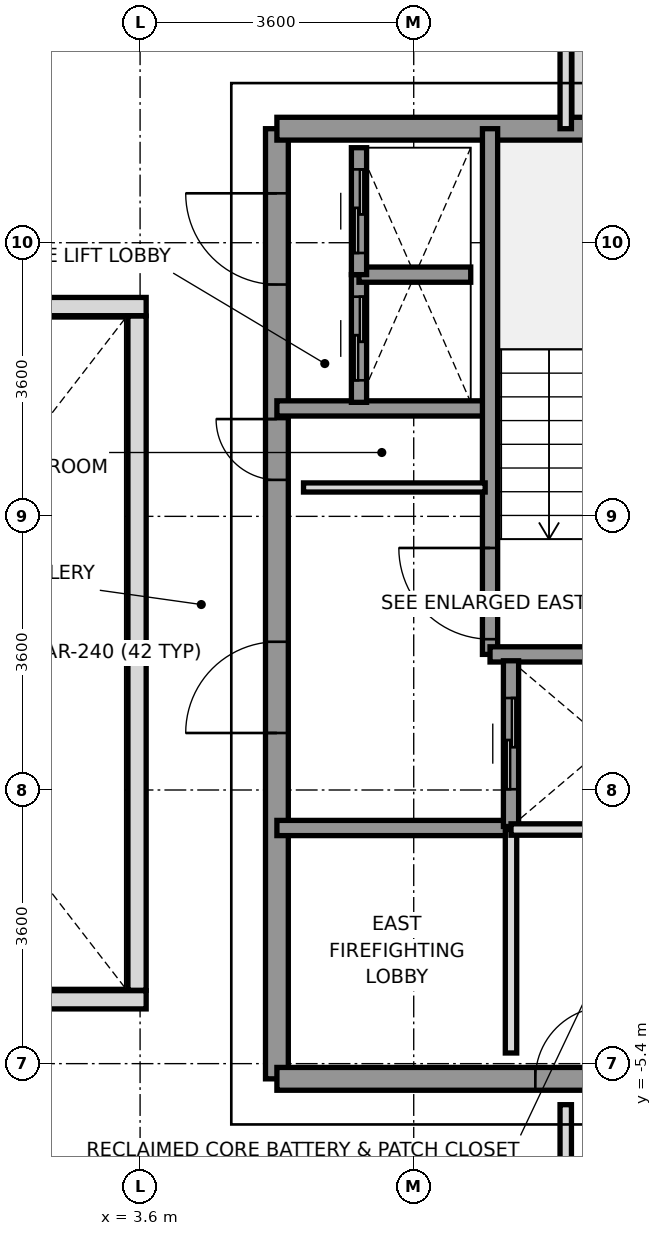
"""IFC4 building model, lengths in metres.
Left out: names, types, materials, properties, quantities, classifications, styles, units other than length and angle.
Written with IfcOpenShell. Run it as: python <this file> out.ifc"""

import sys

from ifc_helpers import new_model, si_unit, direction, frame, frame_2d, origin, place, context, subcontext, project, spatial, rectangle, extrude, source, transform, mapped, element, fill, save


model = new_model("IFC4")
c1 = context("Model", 3, precision=1e-05, world=origin(), true_north=direction((0.0, 1.0)))
c2 = subcontext(c1, "Body", "Model", "MODEL_VIEW")
j1 = project(units=[si_unit("LENGTHUNIT", "METRE"), si_unit("PLANEANGLEUNIT", "RADIAN")], contexts=[c1])
p1 = place(None, origin())
s1 = spatial("IfcSite", under=j1, at=p1, CompositionType="ELEMENT")
p2 = place(p1, origin())
s2 = spatial("IfcBuilding", under=s1, at=p2, CompositionType="ELEMENT")
p3 = place(p2, frame((0.0, 0.0, 236.4)))
s3 = spatial("IfcBuildingStorey", under=s2, at=p3, CompositionType="ELEMENT", Elevation=236.4)
p4 = place(p3, frame((9.4, 8.622, 0.0), z_axis=(0.0, 0.0, 1.0), x_axis=(0.0, -1.0, 0.0)))
e1 = element("IfcWall", 1, at=p4, inside=s3, PredefinedType="PARAPET", context=c2, shape_type="SweptSolid", body=[
    extrude(rectangle(XDim=1.669, YDim=0.24, at=frame_2d((0.834, 0.0))), origin(), (0.0, 0.0, 1.0), 1.15),
])
p5 = place(p3, frame((5.4, -5.6, 0.0), z_axis=(0.0, 0.0, 1.0), x_axis=(0.0, 1.0, 0.0)))
e2 = element("IfcWall", 2, at=p5, inside=s3, PredefinedType="SHEAR", context=c2, shape_type="SweptSolid", body=[
    extrude(rectangle(XDim=12.5, YDim=0.3, at=frame_2d((6.25, 0.0))), origin(), (0.0, 0.0, 1.0), 3.01),
])
p6 = place(p5, frame((4.55, 0.0, 0.0)))
e3 = element("IfcOpeningElement", 3, at=p6, cuts=e2, PredefinedType="OPENING", context=c2, shape_type="SweptSolid", body=[
    extrude(rectangle(XDim=1.2, YDim=2.2, at=frame_2d((0.6, 1.1))), frame((0.0, 0.16, 0.0), z_axis=(0.0, -1.0, 0.0), x_axis=(1.0, 0.0, 0.0)), (0.0, 0.0, 1.0), 0.32),
])
p7 = place(p5, frame((10.45, 0.0, 0.0)))
e4 = element("IfcOpeningElement", 4, at=p7, cuts=e2, PredefinedType="OPENING", context=c2, shape_type="SweptSolid", body=[
    extrude(rectangle(XDim=1.2, YDim=2.2, at=frame_2d((0.6, 1.1))), frame((0.0, 0.16, 0.0), z_axis=(0.0, -1.0, 0.0), x_axis=(1.0, 0.0, 0.0)), (0.0, 0.0, 1.0), 0.32),
])
p8 = place(p5, frame((7.88, 0.0, 0.0)))
e5 = element("IfcOpeningElement", 5, at=p8, cuts=e2, PredefinedType="OPENING", context=c2, shape_type="SweptSolid", body=[
    extrude(rectangle(XDim=0.8, YDim=2.1, at=frame_2d((0.4, 1.05))), frame((0.0, 0.16, 0.0), z_axis=(0.0, -1.0, 0.0), x_axis=(1.0, 0.0, 0.0)), (0.0, 0.0, 1.0), 0.32),
])
p9 = place(p3, frame((5.4, 6.9, 0.0), z_axis=(0.0, 0.0, 1.0), x_axis=(1.0, 0.0, 0.0)))
e6 = element("IfcWall", 6, at=p9, inside=s3, PredefinedType="SHEAR", context=c2, shape_type="SweptSolid", body=[
    extrude(rectangle(XDim=5.956, YDim=0.3, at=frame_2d((2.978, 0.0))), origin(), (0.0, 0.0, 1.0), 3.01),
])
p10 = place(p3, frame((5.4, -5.6, 0.0), z_axis=(0.0, 0.0, 1.0), x_axis=(1.0, 0.0, 0.0)))
e7 = element("IfcWall", 7, at=p10, inside=s3, PredefinedType="SHEAR", context=c2, shape_type="SweptSolid", body=[
    extrude(rectangle(XDim=7.8, YDim=0.3, at=frame_2d((3.9, 0.0))), origin(), (0.0, 0.0, 1.0), 3.01),
])
p11 = place(p10, frame((5.85, 0.0, 0.0)))
e8 = element("IfcOpeningElement", 8, at=p11, cuts=e7, PredefinedType="OPENING", context=c2, shape_type="SweptSolid", body=[
    extrude(rectangle(XDim=0.8, YDim=2.1, at=frame_2d((0.4, 1.05))), frame((0.0, 0.16, 0.0), z_axis=(0.0, -1.0, 0.0), x_axis=(1.0, 0.0, 0.0)), (0.0, 0.0, 1.0), 0.32),
])
p12 = place(p10, frame((3.4, 0.0, 0.0)))
e9 = element("IfcOpeningElement", 9, at=p12, cuts=e7, PredefinedType="OPENING", context=c2, shape_type="SweptSolid", body=[
    extrude(rectangle(XDim=0.95, YDim=2.15, at=frame_2d((0.475, 1.075))), frame((0.0, 0.16, 0.0), z_axis=(0.0, -1.0, 0.0), x_axis=(1.0, 0.0, 0.0)), (0.0, 0.0, 1.0), 0.32),
])
p13 = place(p3, frame((5.4, 3.22, 0.0), z_axis=(0.0, 0.0, 1.0), x_axis=(1.0, 0.0, 0.0)))
e10 = element("IfcWall", 10, at=p13, inside=s3, PredefinedType="SOLIDWALL", context=c2, shape_type="SweptSolid", body=[
    extrude(rectangle(XDim=2.78, YDim=0.2, at=frame_2d((1.39, 0.0))), origin(), (0.0, 0.0, 1.0), 3.01),
])
p14 = place(p3, frame((5.4, -2.3, 0.0), z_axis=(0.0, 0.0, 1.0), x_axis=(1.0, 0.0, 0.0)))
e11 = element("IfcWall", 11, at=p14, inside=s3, PredefinedType="SOLIDWALL", context=c2, shape_type="SweptSolid", body=[
    extrude(rectangle(XDim=3.08, YDim=0.2, at=frame_2d((1.54, 0.0))), origin(), (0.0, 0.0, 1.0), 3.01),
])
p15 = place(p3, frame((8.204, -0.016, 0.0), z_axis=(0.0, 0.0, 1.0), x_axis=(0.0, 1.0, 0.0)))
e12 = element("IfcWall", 12, at=p15, inside=s3, PredefinedType="SOLIDWALL", context=c2, shape_type="SweptSolid", body=[
    extrude(rectangle(XDim=6.916, YDim=0.2, at=frame_2d((3.458, 0.0))), origin(), (0.0, 0.0, 1.0), 3.01),
])
p16 = place(p15, frame((0.2, 0.0, 0.0)))
e13 = element("IfcOpeningElement", 13, at=p16, cuts=e12, PredefinedType="OPENING", context=c2, shape_type="SweptSolid", body=[
    extrude(rectangle(XDim=1.2, YDim=2.2, at=frame_2d((0.6, 1.1))), frame((0.0, 0.11, 0.0), z_axis=(0.0, -1.0, 0.0), x_axis=(1.0, 0.0, 0.0)), (0.0, 0.0, 1.0), 0.22),
])
p17 = place(p3, frame((8.204, -0.016, 0.0), z_axis=(0.0, 0.0, 1.0), x_axis=(1.0, 0.0, 0.0)))
e14 = element("IfcWall", 14, at=p17, inside=s3, PredefinedType="SOLIDWALL", context=c2, shape_type="SweptSolid", body=[
    extrude(rectangle(XDim=3.152, YDim=0.2, at=frame_2d((1.576, 0.0))), origin(), (0.0, 0.0, 1.0), 3.01),
])
p18 = place(p3, frame((8.48, -2.28, 0.0), z_axis=(0.0, 0.0, 1.0), x_axis=(0.0, 1.0, 0.0)))
e15 = element("IfcWall", 15, at=p18, inside=s3, PredefinedType="SOLIDWALL", context=c2, shape_type="SweptSolid", body=[
    extrude(rectangle(XDim=2.18, YDim=0.2, at=frame_2d((1.09, 0.0))), origin(), (0.0, 0.0, 1.0), 3.01),
])
p19 = place(p18, frame((0.49, 0.0, 0.0)))
e16 = element("IfcOpeningElement", 16, at=p19, cuts=e15, PredefinedType="OPENING", context=c2, shape_type="SweptSolid", body=[
    extrude(rectangle(XDim=1.2, YDim=2.2, at=frame_2d((0.6, 1.1))), frame((0.0, 0.11, 0.0), z_axis=(0.0, -1.0, 0.0), x_axis=(1.0, 0.0, 0.0)), (0.0, 0.0, 1.0), 0.22),
])
p20 = place(p3, frame((6.48, 3.3, 0.0), z_axis=(0.0, 0.0, 1.0), x_axis=(0.0, 1.0, 0.0)))
e17 = element("IfcWall", 17, at=p20, inside=s3, PredefinedType="SOLIDWALL", context=c2, shape_type="SweptSolid", body=[
    extrude(rectangle(XDim=1.68, YDim=0.2, at=frame_2d((0.84, 0.0))), origin(), (0.0, 0.0, 1.0), 3.01),
])
p21 = place(p20, frame((0.29, 0.0, 0.0)))
e18 = element("IfcOpeningElement", 18, at=p21, cuts=e17, PredefinedType="OPENING", context=c2, shape_type="SweptSolid", body=[
    extrude(rectangle(XDim=1.1, YDim=2.2, at=frame_2d((0.55, 1.1))), frame((0.0, 0.11, 0.0), z_axis=(0.0, -1.0, 0.0), x_axis=(1.0, 0.0, 0.0)), (0.0, 0.0, 1.0), 0.22),
])
p22 = place(p3, frame((6.48, 4.98, 0.0), z_axis=(0.0, 0.0, 1.0), x_axis=(1.0, 0.0, 0.0)))
e19 = element("IfcWall", 19, at=p22, inside=s3, PredefinedType="SOLIDWALL", context=c2, shape_type="SweptSolid", body=[
    extrude(rectangle(XDim=1.47, YDim=0.2, at=frame_2d((0.735, 0.0))), origin(), (0.0, 0.0, 1.0), 3.01),
])
p23 = place(p3, frame((6.48, 4.98, 0.0), z_axis=(0.0, 0.0, 1.0), x_axis=(0.0, 1.0, 0.0)))
e20 = element("IfcWall", 20, at=p23, inside=s3, PredefinedType="SOLIDWALL", context=c2, shape_type="SweptSolid", body=[
    extrude(rectangle(XDim=1.67, YDim=0.2, at=frame_2d((0.835, 0.0))), origin(), (0.0, 0.0, 1.0), 3.01),
])
p24 = place(p23, frame((0.285, 0.0, 0.0)))
e21 = element("IfcOpeningElement", 21, at=p24, cuts=e20, PredefinedType="OPENING", context=c2, shape_type="SweptSolid", body=[
    extrude(rectangle(XDim=1.1, YDim=2.2, at=frame_2d((0.55, 1.1))), frame((0.0, 0.11, 0.0), z_axis=(0.0, -1.0, 0.0), x_axis=(1.0, 0.0, 0.0)), (0.0, 0.0, 1.0), 0.22),
])
p25 = place(p3, frame((5.75, 2.18, 0.0), z_axis=(0.0, 0.0, 1.0), x_axis=(1.0, 0.0, 0.0)))
e22 = element("IfcWall", 22, at=p25, inside=s3, PredefinedType="PARTITIONING", context=c2, shape_type="SweptSolid", body=[
    extrude(rectangle(XDim=2.39, YDim=0.12, at=frame_2d((1.195, 0.0))), origin(), (0.0, 0.0, 1.0), 3.01),
])
p26 = place(p3, frame((8.48, -5.26, 0.0), z_axis=(0.0, 0.0, 1.0), x_axis=(0.0, 1.0, 0.0)))
e23 = element("IfcWall", 23, at=p26, inside=s3, PredefinedType="PARTITIONING", context=c2, shape_type="SweptSolid", body=[
    extrude(rectangle(XDim=2.94, YDim=0.15, at=frame_2d((1.47, 0.0))), origin(), (0.0, 0.0, 1.0), 3.01),
])
p27 = place(p3, frame((8.48, -2.32, 0.0), z_axis=(0.0, 0.0, 1.0), x_axis=(1.0, 0.0, 0.0)))
e24 = element("IfcWall", 24, at=p27, inside=s3, PredefinedType="PARTITIONING", context=c2, shape_type="SweptSolid", body=[
    extrude(rectangle(XDim=2.56, YDim=0.15, at=frame_2d((1.28, 0.0))), origin(), (0.0, 0.0, 1.0), 3.01),
])
p28 = place(p3, frame((9.2, 6.9, 0.0), z_axis=(0.0, 0.0, 1.0), x_axis=(0.0, 1.0, 0.0)))
e25 = element("IfcWall", 25, at=p28, inside=s3, PredefinedType="PARTITIONING", context=c2, shape_type="SweptSolid", body=[
    extrude(rectangle(XDim=3.38, YDim=0.15, at=frame_2d((1.69, 0.0))), origin(), (0.0, 0.0, 1.0), 2.61),
])
p29 = place(p3, frame((9.2, -10.28, 0.0), z_axis=(0.0, 0.0, 1.0), x_axis=(0.0, 1.0, 0.0)))
e26 = element("IfcWall", 26, at=p29, inside=s3, PredefinedType="PARTITIONING", context=c2, shape_type="SweptSolid", body=[
    extrude(rectangle(XDim=4.34, YDim=0.15, at=frame_2d((2.17, 0.0))), origin(), (0.0, 0.0, 1.0), 2.61),
])
for number, where, z_axis, x_axis in (
    (27, (-3.68, -4.56, 0.0), (0.0, 0.0, 1.0), (1.0, 0.0, 0.0)),
    (28, (-3.68, 4.56, 0.0), (0.0, 0.0, 1.0), (1.0, 0.0, 0.0)),
):
    element("IfcWall", number, at=place(p3, frame(where, z_axis=z_axis, x_axis=x_axis)), inside=s3, PredefinedType="PARAPET", context=c2, shape_type="SweptSolid", body=[
        extrude(rectangle(XDim=7.36, YDim=0.24, at=frame_2d((3.68, 0.0))), origin(), (0.0, 0.0, 1.0), 1.15),
    ])
p30 = place(p3, frame((3.56, -4.435, 0.0), z_axis=(0.0, 0.0, 1.0), x_axis=(0.0, 1.0, 0.0)))
e29 = element("IfcWall", 29, at=p30, inside=s3, PredefinedType="PARAPET", context=c2, shape_type="SweptSolid", body=[
    extrude(rectangle(XDim=8.87, YDim=0.24, at=frame_2d((4.435, 0.0))), origin(), (0.0, 0.0, 1.0), 1.15),
])
m1 = source(origin(), c2, "Body", "SweptSolid", [
    extrude(rectangle(XDim=1.2, YDim=2.2, at=frame_2d((0.6, 1.1))), frame((0.0, 0.025, 0.0), z_axis=(0.0, -1.0, 0.0), x_axis=(1.0, 0.0, 0.0)), (0.0, 0.0, 1.0), 0.05),
])
p31 = place(p16, origin())
e30 = element("IfcDoor", 30, at=p31, inside=s3, OperationType="SINGLE_SWING_RIGHT", PredefinedType="DOOR", context=c2, shape_type="MappedRepresentation", body=[
    mapped(m1, transform((0.0, 0.0, 0.0), x_axis=(1.0, 0.0, 0.0), y_axis=(0.0, 1.0, 0.0), z_axis=(0.0, 0.0, 1.0), scale=1.0)),
])
fill(e13, e30)
p32 = place(p6, origin())
e31 = element("IfcDoor", 31, at=p32, inside=s3, OperationType="SINGLE_SWING_LEFT", PredefinedType="DOOR", context=c2, shape_type="MappedRepresentation", body=[
    mapped(m1, transform((0.0, 0.0, 0.0), x_axis=(1.0, 0.0, 0.0), y_axis=(0.0, 1.0, 0.0), z_axis=(0.0, 0.0, 1.0), scale=1.0)),
])
fill(e3, e31)
p33 = place(p7, origin())
e32 = element("IfcDoor", 32, at=p33, inside=s3, OperationType="SINGLE_SWING_RIGHT", PredefinedType="DOOR", context=c2, shape_type="MappedRepresentation", body=[
    mapped(m1, transform((0.0, 0.0, 0.0), x_axis=(1.0, 0.0, 0.0), y_axis=(0.0, 1.0, 0.0), z_axis=(0.0, 0.0, 1.0), scale=1.0)),
])
fill(e4, e32)
m2 = source(origin(), c2, "Body", "SweptSolid", [
    extrude(rectangle(XDim=0.8, YDim=2.1, at=frame_2d((0.4, 1.05))), frame((0.0, 0.025, 0.0), z_axis=(0.0, -1.0, 0.0), x_axis=(1.0, 0.0, 0.0)), (0.0, 0.0, 1.0), 0.05),
])
p34 = place(p8, origin())
e33 = element("IfcDoor", 33, at=p34, inside=s3, OperationType="SINGLE_SWING_RIGHT", PredefinedType="DOOR", context=c2, shape_type="MappedRepresentation", body=[
    mapped(m2, transform((0.0, 0.0, 0.0), x_axis=(1.0, 0.0, 0.0), y_axis=(0.0, 1.0, 0.0), z_axis=(0.0, 0.0, 1.0), scale=1.0)),
])
fill(e5, e33)
m3 = source(origin(), c2, "Body", "SweptSolid", [
    extrude(rectangle(XDim=0.95, YDim=2.15, at=frame_2d((0.475, 1.075))), frame((0.0, 0.025, 0.0), z_axis=(0.0, -1.0, 0.0), x_axis=(1.0, 0.0, 0.0)), (0.0, 0.0, 1.0), 0.05),
])
p35 = place(p12, origin())
e34 = element("IfcDoor", 34, at=p35, inside=s3, OperationType="SINGLE_SWING_RIGHT", PredefinedType="DOOR", context=c2, shape_type="MappedRepresentation", body=[
    mapped(m3, transform((0.0, 0.0, 0.0), x_axis=(1.0, 0.0, 0.0), y_axis=(0.0, 1.0, 0.0), z_axis=(0.0, 0.0, 1.0), scale=1.0)),
])
fill(e9, e34)
p36 = place(p19, origin())
e35 = element("IfcDoor", 35, at=p36, inside=s3, OperationType="SLIDING_TO_RIGHT", PredefinedType="DOOR", context=c2, shape_type="MappedRepresentation", body=[
    mapped(m1, transform((0.0, 0.0, 0.0), x_axis=(1.0, 0.0, 0.0), y_axis=(0.0, 1.0, 0.0), z_axis=(0.0, 0.0, 1.0), scale=1.0)),
])
fill(e16, e35)
m4 = source(origin(), c2, "Body", "SweptSolid", [
    extrude(rectangle(XDim=1.1, YDim=2.2, at=frame_2d((0.55, 1.1))), frame((0.0, 0.025, 0.0), z_axis=(0.0, -1.0, 0.0), x_axis=(1.0, 0.0, 0.0)), (0.0, 0.0, 1.0), 0.05),
])
p37 = place(p21, origin())
e36 = element("IfcDoor", 36, at=p37, inside=s3, OperationType="SLIDING_TO_LEFT", PredefinedType="DOOR", context=c2, shape_type="MappedRepresentation", body=[
    mapped(m4, transform((0.0, 0.0, 0.0), x_axis=(1.0, 0.0, 0.0), y_axis=(0.0, 1.0, 0.0), z_axis=(0.0, 0.0, 1.0), scale=1.0)),
])
fill(e18, e36)
p38 = place(p24, origin())
e37 = element("IfcDoor", 37, at=p38, inside=s3, OperationType="SLIDING_TO_LEFT", PredefinedType="DOOR", context=c2, shape_type="MappedRepresentation", body=[
    mapped(m4, transform((0.0, 0.0, 0.0), x_axis=(1.0, 0.0, 0.0), y_axis=(0.0, 1.0, 0.0), z_axis=(0.0, 0.0, 1.0), scale=1.0)),
])
fill(e21, e37)
save(model, sys.argv[1])
